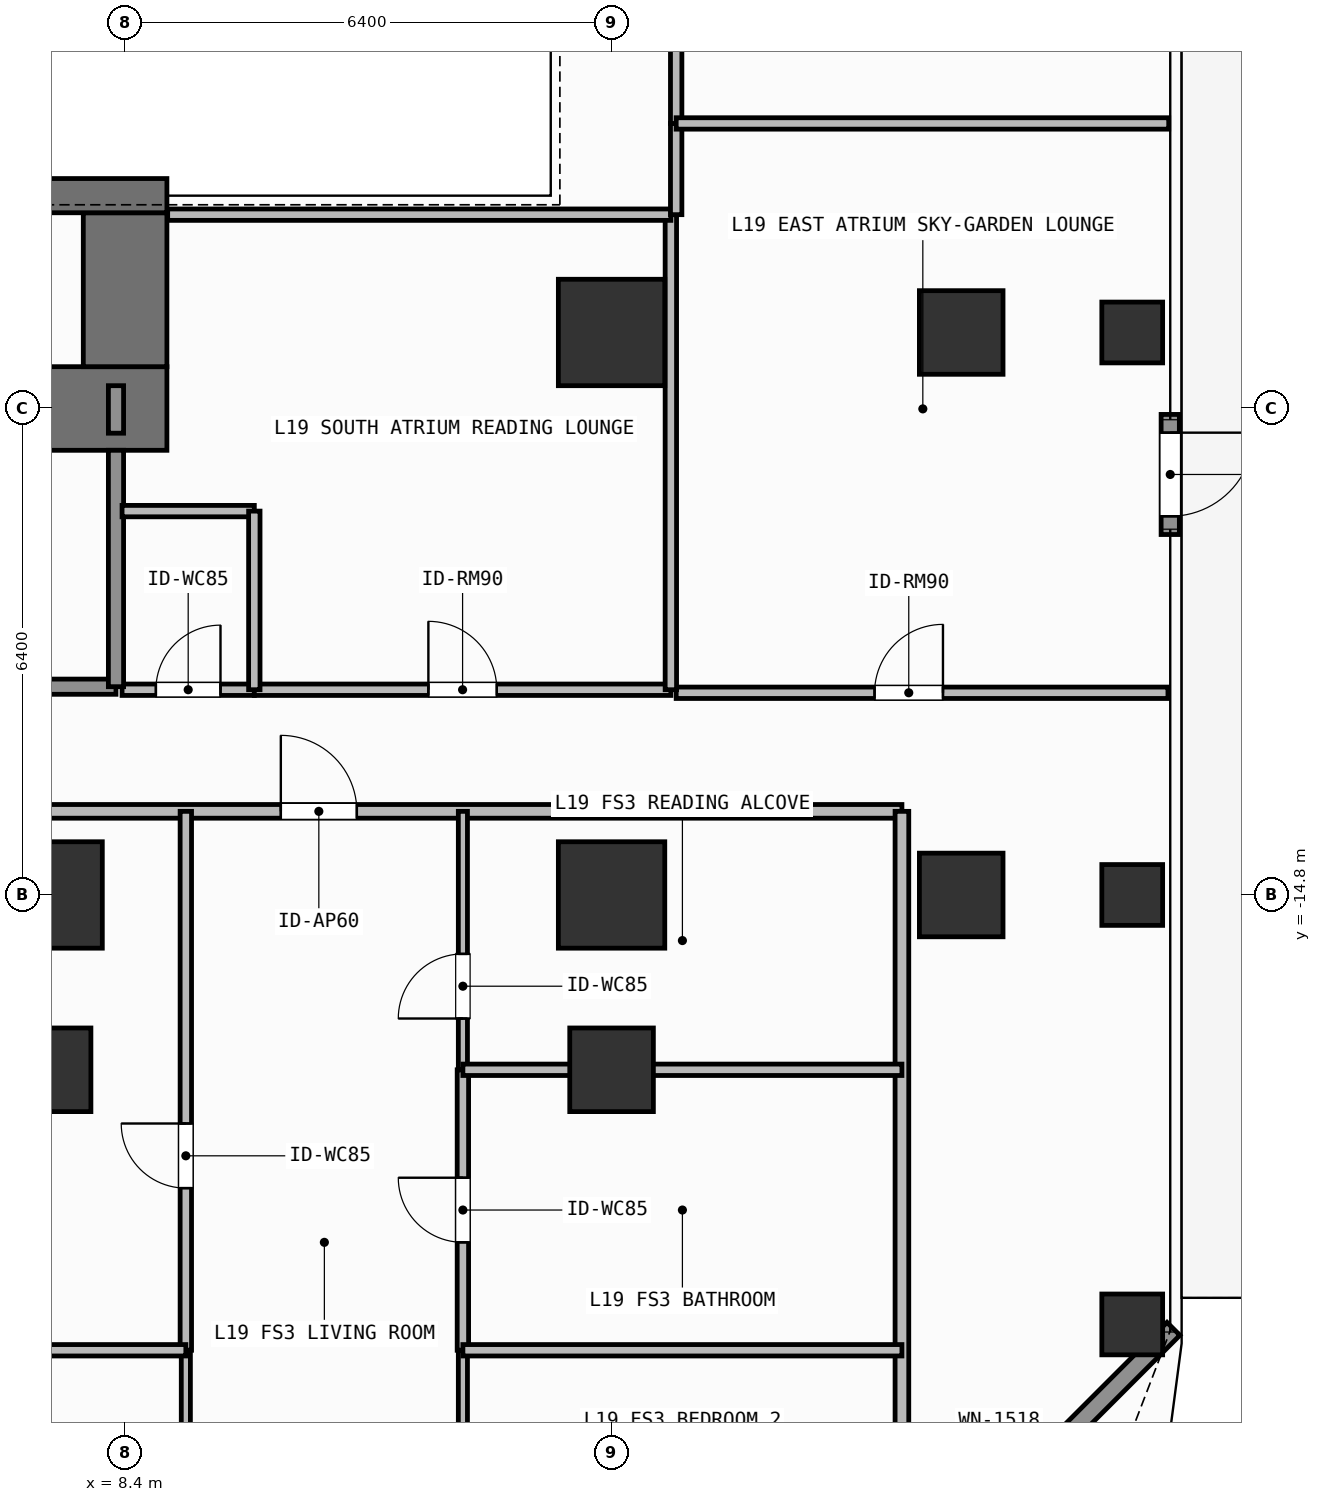
"""IFC4 building model, lengths in metres.
Left out: names, types, materials, properties, quantities, classifications, styles, units other than length and angle.
Written with IfcOpenShell. Run it as: python <this file> out.ifc"""

import sys

from ifc_helpers import new_model, si_unit, direction, frame, frame_2d, origin, origin_2d, place, context, subcontext, project, spatial, rectangle, hollow_rectangle, extrude, element, fill, save


model = new_model("IFC4")
c1 = context("Model", 3, precision=1e-05, world=origin(), true_north=direction((0.0, 1.0)))
c2 = subcontext(c1, "Body", "Model", "MODEL_VIEW")
j1 = project(units=[si_unit("LENGTHUNIT", "METRE"), si_unit("PLANEANGLEUNIT", "RADIAN")], contexts=[c1])
p1 = place(None, origin())
s1 = spatial("IfcSite", under=j1, at=p1, CompositionType="ELEMENT")
p2 = place(p1, origin())
s2 = spatial("IfcBuilding", under=s1, at=p2, CompositionType="ELEMENT")
p3 = place(p2, frame((0.0, 0.0, 73.5)))
s3 = spatial("IfcBuildingStorey", under=s2, at=p3, CompositionType="ELEMENT", Elevation=73.5)
p4 = place(p3, frame((6.12, -8.4, 0.0), z_axis=(0.0, 0.0, 1.0), x_axis=(1.0, 0.0, 0.0)))
e1 = element("IfcWall", 1, at=p4, inside=s3, PredefinedType="SHEAR", context=c2, shape_type="SweptSolid", body=[
    extrude(rectangle(XDim=2.83, YDim=1.1, at=frame_2d((1.415, 0.0))), origin(), (0.0, 0.0, 1.0), 3.9),
])
p5 = place(p3, frame((8.4, -7.85, 0.0), z_axis=(0.0, 0.0, 1.0), x_axis=(0.0, 1.0, 0.0)))
e2 = element("IfcWall", 2, at=p5, inside=s3, PredefinedType="SHEAR", context=c2, shape_type="SweptSolid", body=[
    extrude(rectangle(XDim=2.025, YDim=1.1, at=frame_2d((1.013, 0.0))), origin(), (0.0, 0.0, 1.0), 3.9),
])
p6 = place(p3, frame((3.045, -5.6, 0.0), z_axis=(0.0, 0.0, 1.0), x_axis=(1.0, 0.0, 0.0)))
e3 = element("IfcWall", 3, at=p6, inside=s3, PredefinedType="SHEAR", context=c2, shape_type="SweptSolid", body=[
    extrude(rectangle(XDim=5.905, YDim=0.45, at=frame_2d((2.953, 0.0))), origin(), (0.0, 0.0, 1.0), 3.9),
])
for number, where, z_axis, x_axis in (
    (4, (7.4, -14.8, 0.0), (0.0, 0.0, 1.0), (1.0, 0.0, 0.0)),
    (5, (14.8, -14.8, 0.0), (0.0, 0.0, 1.0), (1.0, 0.0, 0.0)),
    (6, (14.8, -7.4, 0.0), (0.0, 0.0, 1.0), (1.0, 0.0, 0.0)),
):
    element("IfcColumn", number, at=place(p3, frame(where, z_axis=z_axis, x_axis=x_axis)), inside=s3, PredefinedType="COLUMN", context=c2, shape_type="SweptSolid", body=[
        extrude(rectangle(XDim=1.4, YDim=1.4, at=origin_2d()), origin(), (0.0, 0.0, 1.0), 3.9),
    ])
for number, where, z_axis, x_axis in (
    (7, (19.4, -14.8, 0.0), (0.0, 0.0, 1.0), (1.0, 0.0, 0.0)),
    (8, (19.4, -7.4, 0.0), (0.0, 0.0, 1.0), (1.0, 0.0, 0.0)),
    (9, (7.4, -17.1, 0.0), (0.0, 0.0, 1.0), (1.0, 0.0, 0.0)),
    (10, (14.8, -17.1, 0.0), (0.0, 0.0, 1.0), (1.0, 0.0, 0.0)),
):
    element("IfcColumn", number, at=place(p3, frame(where, z_axis=z_axis, x_axis=x_axis)), inside=s3, PredefinedType="COLUMN", context=c2, shape_type="SweptSolid", body=[
        extrude(rectangle(XDim=1.1, YDim=1.1, at=origin_2d()), origin(), (0.0, 0.0, 1.0), 3.9),
    ])
for number, where, z_axis, x_axis in (
    (11, (21.65, -20.45, 0.0), (0.0, 0.0, 1.0), (1.0, 0.0, 0.0)),
    (12, (21.65, -14.8, 0.0), (0.0, 0.0, 1.0), (1.0, 0.0, 0.0)),
    (13, (21.65, -7.4, 0.0), (0.0, 0.0, 1.0), (1.0, 0.0, 0.0)),
):
    element("IfcColumn", number, at=place(p3, frame(where, z_axis=z_axis, x_axis=x_axis)), inside=s3, PredefinedType="COLUMN", context=c2, shape_type="SweptSolid", body=[
        extrude(hollow_rectangle(XDim=0.8, YDim=0.8, WallThickness=0.036, at=origin_2d()), origin(), (0.0, 0.0, 1.0), 3.9),
    ])
p7 = place(p3, frame((22.15, -8.478, 0.0), z_axis=(0.0, 0.0, 1.0), x_axis=(0.0, -1.0, 0.0)))
e14 = element("IfcWall", 14, at=p7, inside=s3, PredefinedType="SOLIDWALL", context=c2, shape_type="SweptSolid", body=[
    extrude(rectangle(XDim=1.58, YDim=0.24, at=frame_2d((0.79, 0.0))), origin(), (0.0, 0.0, 1.0), 3.6),
])
p8 = place(p7, frame((0.24, 0.0, 0.0)))
e15 = element("IfcOpeningElement", 15, at=p8, cuts=e14, PredefinedType="OPENING", context=c2, shape_type="SweptSolid", body=[
    extrude(rectangle(XDim=1.1, YDim=2.2, at=frame_2d((0.55, 1.1))), frame((0.0, 0.13, 0.0), z_axis=(0.0, -1.0, 0.0), x_axis=(1.0, 0.0, 0.0)), (0.0, 0.0, 1.0), 0.26),
])
p9 = place(p3, frame((22.192, -20.508, 0.0), z_axis=(0.0, 0.0, 1.0), x_axis=(-0.707106781187, -0.707106781187, 0.0)))
e16 = element("IfcWall", 16, at=p9, inside=s3, PredefinedType="SOLIDWALL", context=c2, shape_type="SweptSolid", body=[
    extrude(rectangle(XDim=6.484, YDim=0.24, at=frame_2d((3.242, 0.0))), origin(), (0.0, 0.0, 1.0), 3.6),
])
p10 = place(p9, frame((2.492, 0.0, 0.8)))
e17 = element("IfcOpeningElement", 17, at=p10, cuts=e16, PredefinedType="OPENING", context=c2, shape_type="SweptSolid", body=[
    extrude(rectangle(XDim=1.5, YDim=1.85, at=frame_2d((0.75, 0.925))), frame((0.0, 0.13, 0.0), z_axis=(0.0, -1.0, 0.0), x_axis=(1.0, 0.0, 0.0)), (0.0, 0.0, 1.0), 0.26),
])
p11 = place(p3, frame((4.58, -12.06, 0.0), z_axis=(0.0, 0.0, 1.0), x_axis=(1.0, 0.0, 0.0)))
e18 = element("IfcWall", 18, at=p11, inside=s3, PredefinedType="SOLIDWALL", context=c2, shape_type="SweptSolid", body=[
    extrude(rectangle(XDim=3.7, YDim=0.2, at=frame_2d((1.85, 0.0))), origin(), (0.0, 0.0, 1.0), 3.6),
])
p12 = place(p11, frame((1.212, 0.0, 0.0)))
e19 = element("IfcOpeningElement", 19, at=p12, cuts=e18, PredefinedType="OPENING", context=c2, shape_type="SweptSolid", body=[
    extrude(rectangle(XDim=1.1, YDim=2.15, at=frame_2d((0.55, 1.075))), frame((0.0, 0.11, 0.0), z_axis=(0.0, -1.0, 0.0), x_axis=(1.0, 0.0, 0.0)), (0.0, 0.0, 1.0), 0.22),
])
p13 = place(p3, frame((8.36, -12.1, 0.0), z_axis=(0.0, 0.0, 1.0), x_axis=(1.0, 0.0, 0.0)))
e20 = element("IfcWall", 20, at=p13, inside=s3, PredefinedType="PARTITIONING", context=c2, shape_type="SweptSolid", body=[
    extrude(rectangle(XDim=1.74, YDim=0.15, at=frame_2d((0.87, 0.0))), origin(), (0.0, 0.0, 1.0), 3.6),
])
p14 = place(p13, frame((0.445, 0.0, 0.0)))
e21 = element("IfcOpeningElement", 21, at=p14, cuts=e20, PredefinedType="OPENING", context=c2, shape_type="SweptSolid", body=[
    extrude(rectangle(XDim=0.85, YDim=2.1, at=frame_2d((0.425, 1.05))), frame((0.0, 0.085, 0.0), z_axis=(0.0, -1.0, 0.0), x_axis=(1.0, 0.0, 0.0)), (0.0, 0.0, 1.0), 0.17),
])
p15 = place(p3, frame((10.1, -12.1, 0.0), z_axis=(0.0, 0.0, 1.0), x_axis=(1.0, 0.0, 0.0)))
e22 = element("IfcWall", 22, at=p15, inside=s3, PredefinedType="PARTITIONING", context=c2, shape_type="SweptSolid", body=[
    extrude(rectangle(XDim=5.48, YDim=0.15, at=frame_2d((2.74, 0.0))), origin(), (0.0, 0.0, 1.0), 3.6),
])
p16 = place(p15, frame((2.29, 0.0, 0.0)))
e23 = element("IfcOpeningElement", 23, at=p16, cuts=e22, PredefinedType="OPENING", context=c2, shape_type="SweptSolid", body=[
    extrude(rectangle(XDim=0.9, YDim=2.1, at=frame_2d((0.45, 1.05))), frame((0.0, 0.085, 0.0), z_axis=(0.0, -1.0, 0.0), x_axis=(1.0, 0.0, 0.0)), (0.0, 0.0, 1.0), 0.17),
])
p17 = place(p3, frame((2.918, -13.7, 0.0), z_axis=(0.0, 0.0, 1.0), x_axis=(1.0, 0.0, 0.0)))
e24 = element("IfcWall", 24, at=p17, inside=s3, PredefinedType="PARTITIONING", context=c2, shape_type="SweptSolid", body=[
    extrude(rectangle(XDim=15.702, YDim=0.18, at=frame_2d((7.851, 0.0))), origin(), (0.0, 0.0, 1.0), 3.6),
])
p18 = place(p17, frame((7.531, 0.0, 0.0)))
e25 = element("IfcOpeningElement", 25, at=p18, cuts=e24, PredefinedType="OPENING", context=c2, shape_type="SweptSolid", body=[
    extrude(rectangle(XDim=1.0, YDim=2.2, at=frame_2d((0.5, 1.1))), frame((0.0, 0.1, 0.0), z_axis=(0.0, -1.0, 0.0), x_axis=(1.0, 0.0, 0.0)), (0.0, 0.0, 1.0), 0.2),
])
p19 = place(p3, frame((9.199, -20.79, 0.0), z_axis=(0.0, 0.0, 1.0), x_axis=(0.0, 1.0, 0.0)))
e26 = element("IfcWall", 26, at=p19, inside=s3, PredefinedType="PARTITIONING", context=c2, shape_type="SweptSolid", body=[
    extrude(rectangle(XDim=7.09, YDim=0.15, at=frame_2d((3.545, 0.0))), origin(), (0.0, 0.0, 1.0), 3.6),
])
p20 = place(p19, frame((2.133, 0.0, 0.0)))
e27 = element("IfcOpeningElement", 27, at=p20, cuts=e26, PredefinedType="OPENING", context=c2, shape_type="SweptSolid", body=[
    extrude(rectangle(XDim=0.85, YDim=2.1, at=frame_2d((0.425, 1.05))), frame((0.0, 0.085, 0.0), z_axis=(0.0, -1.0, 0.0), x_axis=(1.0, 0.0, 0.0)), (0.0, 0.0, 1.0), 0.17),
])
p21 = place(p3, frame((9.199, -25.03, 0.0), z_axis=(0.0, 0.0, 1.0), x_axis=(0.0, 1.0, 0.0)))
e28 = element("IfcWall", 28, at=p21, inside=s3, PredefinedType="PARTITIONING", context=c2, shape_type="SweptSolid", body=[
    extrude(rectangle(XDim=4.24, YDim=0.12, at=frame_2d((2.12, 0.0))), origin(), (0.0, 0.0, 1.0), 3.6),
])
p22 = place(p21, frame((1.581, 0.0, 0.0)))
e29 = element("IfcOpeningElement", 29, at=p22, cuts=e28, PredefinedType="OPENING", context=c2, shape_type="SweptSolid", body=[
    extrude(rectangle(XDim=0.9, YDim=2.1, at=frame_2d((0.45, 1.05))), frame((0.0, 0.07, 0.0), z_axis=(0.0, -1.0, 0.0), x_axis=(1.0, 0.0, 0.0)), (0.0, 0.0, 1.0), 0.14),
])
p23 = place(p3, frame((12.844, -20.79, 0.0), z_axis=(0.0, 0.0, 1.0), x_axis=(0.0, 1.0, 0.0)))
e30 = element("IfcWall", 30, at=p23, inside=s3, PredefinedType="PARTITIONING", context=c2, shape_type="SweptSolid", body=[
    extrude(rectangle(XDim=3.69, YDim=0.15, at=frame_2d((1.845, 0.0))), origin(), (0.0, 0.0, 1.0), 3.6),
])
p24 = place(p23, frame((1.42, 0.0, 0.0)))
e31 = element("IfcOpeningElement", 31, at=p24, cuts=e30, PredefinedType="OPENING", context=c2, shape_type="SweptSolid", body=[
    extrude(rectangle(XDim=0.85, YDim=2.1, at=frame_2d((0.425, 1.05))), frame((0.0, 0.085, 0.0), z_axis=(0.0, -1.0, 0.0), x_axis=(1.0, 0.0, 0.0)), (0.0, 0.0, 1.0), 0.17),
])
p25 = place(p3, frame((12.844, -17.1, 0.0), z_axis=(0.0, 0.0, 1.0), x_axis=(0.0, 1.0, 0.0)))
e32 = element("IfcWall", 32, at=p25, inside=s3, PredefinedType="PARTITIONING", context=c2, shape_type="SweptSolid", body=[
    extrude(rectangle(XDim=3.4, YDim=0.12, at=frame_2d((1.7, 0.0))), origin(), (0.0, 0.0, 1.0), 3.6),
])
p26 = place(p25, frame((0.675, 0.0, 0.0)))
e33 = element("IfcOpeningElement", 33, at=p26, cuts=e32, PredefinedType="OPENING", context=c2, shape_type="SweptSolid", body=[
    extrude(rectangle(XDim=0.85, YDim=2.1, at=frame_2d((0.425, 1.05))), frame((0.0, 0.07, 0.0), z_axis=(0.0, -1.0, 0.0), x_axis=(1.0, 0.0, 0.0)), (0.0, 0.0, 1.0), 0.14),
])
p27 = place(p3, frame((12.844, -25.03, 0.0), z_axis=(0.0, 0.0, 1.0), x_axis=(0.0, 1.0, 0.0)))
e34 = element("IfcWall", 34, at=p27, inside=s3, PredefinedType="PARTITIONING", context=c2, shape_type="SweptSolid", body=[
    extrude(rectangle(XDim=4.24, YDim=0.12, at=frame_2d((2.12, 0.0))), origin(), (0.0, 0.0, 1.0), 3.6),
])
p28 = place(p27, frame((1.581, 0.0, 0.0)))
e35 = element("IfcOpeningElement", 35, at=p28, cuts=e34, PredefinedType="OPENING", context=c2, shape_type="SweptSolid", body=[
    extrude(rectangle(XDim=0.9, YDim=2.1, at=frame_2d((0.45, 1.05))), frame((0.0, 0.07, 0.0), z_axis=(0.0, -1.0, 0.0), x_axis=(1.0, 0.0, 0.0)), (0.0, 0.0, 1.0), 0.14),
])
p29 = place(p3, frame((15.65, -12.14, 0.0), z_axis=(0.0, 0.0, 1.0), x_axis=(1.0, 0.0, 0.0)))
e36 = element("IfcWall", 36, at=p29, inside=s3, PredefinedType="PARTITIONING", context=c2, shape_type="SweptSolid", body=[
    extrude(rectangle(XDim=6.47, YDim=0.15, at=frame_2d((3.235, 0.0))), origin(), (0.0, 0.0, 1.0), 3.6),
])
p30 = place(p29, frame((2.61, 0.0, 0.0)))
e37 = element("IfcOpeningElement", 37, at=p30, cuts=e36, PredefinedType="OPENING", context=c2, shape_type="SweptSolid", body=[
    extrude(rectangle(XDim=0.9, YDim=2.1, at=frame_2d((0.45, 1.05))), frame((0.0, 0.085, 0.0), z_axis=(0.0, -1.0, 0.0), x_axis=(1.0, 0.0, 0.0)), (0.0, 0.0, 1.0), 0.17),
])
p31 = place(p3, frame((8.28, -12.06, 0.0), z_axis=(0.0, 0.0, 1.0), x_axis=(0.0, 1.0, 0.0)))
e38 = element("IfcWall", 38, at=p31, inside=s3, PredefinedType="SOLIDWALL", context=c2, shape_type="SweptSolid", body=[
    extrude(rectangle(XDim=3.11, YDim=0.2, at=frame_2d((1.555, 0.0))), origin(), (0.0, 0.0, 1.0), 3.6),
])
p32 = place(p3, frame((8.28, -8.725, 0.0), z_axis=(0.0, 0.0, 1.0), x_axis=(0.0, 1.0, 0.0)))
e39 = element("IfcWall", 39, at=p32, inside=s3, PredefinedType="SOLIDWALL", context=c2, shape_type="SweptSolid", body=[
    extrude(rectangle(XDim=0.625, YDim=0.2, at=frame_2d((0.312, 0.0))), origin(), (0.0, 0.0, 1.0), 3.6),
])
p33 = place(p3, frame((8.36, -9.75, 0.0), z_axis=(0.0, 0.0, 1.0), x_axis=(1.0, 0.0, 0.0)))
e40 = element("IfcWall", 40, at=p33, inside=s3, PredefinedType="PARTITIONING", context=c2, shape_type="SweptSolid", body=[
    extrude(rectangle(XDim=1.74, YDim=0.15, at=frame_2d((0.87, 0.0))), origin(), (0.0, 0.0, 1.0), 3.6),
])
p34 = place(p3, frame((10.1, -12.1, 0.0), z_axis=(0.0, 0.0, 1.0), x_axis=(0.0, 1.0, 0.0)))
e41 = element("IfcWall", 41, at=p34, inside=s3, PredefinedType="PARTITIONING", context=c2, shape_type="SweptSolid", body=[
    extrude(rectangle(XDim=2.35, YDim=0.15, at=frame_2d((1.175, 0.0))), origin(), (0.0, 0.0, 1.0), 3.6),
])
p35 = place(p3, frame((15.58, -12.1, 0.0), z_axis=(0.0, 0.0, 1.0), x_axis=(0.0, 1.0, 0.0)))
e42 = element("IfcWall", 42, at=p35, inside=s3, PredefinedType="PARTITIONING", context=c2, shape_type="SweptSolid", body=[
    extrude(rectangle(XDim=6.25, YDim=0.15, at=frame_2d((3.125, 0.0))), origin(), (0.0, 0.0, 1.0), 3.6),
])
p36 = place(p3, frame((8.96, -5.85, 0.0), z_axis=(0.0, 0.0, 1.0), x_axis=(1.0, 0.0, 0.0)))
e43 = element("IfcWall", 43, at=p36, inside=s3, PredefinedType="PARTITIONING", context=c2, shape_type="SweptSolid", body=[
    extrude(rectangle(XDim=6.62, YDim=0.15, at=frame_2d((3.31, 0.0))), origin(), (0.0, 0.0, 1.0), 3.6),
])
p37 = place(p3, frame((18.62, -23.91, 0.0), z_axis=(0.0, 0.0, 1.0), x_axis=(0.0, 1.0, 0.0)))
e44 = element("IfcWall", 44, at=p37, inside=s3, PredefinedType="PARTITIONING", context=c2, shape_type="SweptSolid", body=[
    extrude(rectangle(XDim=10.21, YDim=0.18, at=frame_2d((5.105, 0.0))), origin(), (0.0, 0.0, 1.0), 3.6),
])
p38 = place(p3, frame((2.918, -20.79, 0.0), z_axis=(0.0, 0.0, 1.0), x_axis=(1.0, 0.0, 0.0)))
e45 = element("IfcWall", 45, at=p38, inside=s3, PredefinedType="PARTITIONING", context=c2, shape_type="SweptSolid", body=[
    extrude(rectangle(XDim=6.281, YDim=0.15, at=frame_2d((3.141, 0.0))), origin(), (0.0, 0.0, 1.0), 3.6),
])
p39 = place(p3, frame((12.844, -17.1, 0.0), z_axis=(0.0, 0.0, 1.0), x_axis=(1.0, 0.0, 0.0)))
e46 = element("IfcWall", 46, at=p39, inside=s3, PredefinedType="PARTITIONING", context=c2, shape_type="SweptSolid", body=[
    extrude(rectangle(XDim=5.776, YDim=0.15, at=frame_2d((2.888, 0.0))), origin(), (0.0, 0.0, 1.0), 3.002),
])
p40 = place(p3, frame((12.844, -20.79, 0.0), z_axis=(0.0, 0.0, 1.0), x_axis=(1.0, 0.0, 0.0)))
e47 = element("IfcWall", 47, at=p40, inside=s3, PredefinedType="PARTITIONING", context=c2, shape_type="SweptSolid", body=[
    extrude(rectangle(XDim=5.776, YDim=0.15, at=frame_2d((2.888, 0.0))), origin(), (0.0, 0.0, 1.0), 3.6),
])
p41 = place(p3, frame((15.65, -5.85, 0.0), z_axis=(0.0, 0.0, 1.0), x_axis=(0.0, 1.0, 0.0)))
e48 = element("IfcWall", 48, at=p41, inside=s3, PredefinedType="PARTITIONING", context=c2, shape_type="SweptSolid", body=[
    extrude(rectangle(XDim=1.2, YDim=0.15, at=frame_2d((0.6, 0.0))), origin(), (0.0, 0.0, 1.0), 3.6),
])
p42 = place(p3, frame((15.65, -4.65, 0.0), z_axis=(0.0, 0.0, 1.0), x_axis=(0.0, 1.0, 0.0)))
e49 = element("IfcWall", 49, at=p42, inside=s3, PredefinedType="PARTITIONING", context=c2, shape_type="SweptSolid", body=[
    extrude(rectangle(XDim=10.5, YDim=0.15, at=frame_2d((5.25, 0.0))), origin(), (0.0, 0.0, 1.0), 3.6),
])
p43 = place(p3, frame((15.65, -4.65, 0.0), z_axis=(0.0, 0.0, 1.0), x_axis=(1.0, 0.0, 0.0)))
e50 = element("IfcWall", 50, at=p43, inside=s3, PredefinedType="PARTITIONING", context=c2, shape_type="SweptSolid", body=[
    extrude(rectangle(XDim=6.48, YDim=0.15, at=frame_2d((3.24, 0.0))), origin(), (0.0, 0.0, 1.0), 3.6),
])
p44 = place(p8, origin())
e51 = element("IfcDoor", 51, at=p44, inside=s3, OperationType="SINGLE_SWING_LEFT", PredefinedType="DOOR", context=c2, shape_type="SweptSolid", body=[
    extrude(rectangle(XDim=1.1, YDim=2.2, at=frame_2d((0.55, 1.1))), frame((0.0, 0.025, 0.0), z_axis=(0.0, -1.0, 0.0), x_axis=(1.0, 0.0, 0.0)), (0.0, 0.0, 1.0), 0.05),
])
fill(e15, e51)
p45 = place(p14, origin())
e52 = element("IfcDoor", 52, at=p45, inside=s3, OperationType="SINGLE_SWING_RIGHT", PredefinedType="DOOR", context=c2, shape_type="SweptSolid", body=[
    extrude(rectangle(XDim=0.85, YDim=2.1, at=frame_2d((0.425, 1.05))), frame((0.0, 0.025, 0.0), z_axis=(0.0, -1.0, 0.0), x_axis=(1.0, 0.0, 0.0)), (0.0, 0.0, 1.0), 0.05),
])
fill(e21, e52)
p46 = place(p16, origin())
e53 = element("IfcDoor", 53, at=p46, inside=s3, OperationType="SINGLE_SWING_LEFT", PredefinedType="DOOR", context=c2, shape_type="SweptSolid", body=[
    extrude(rectangle(XDim=0.9, YDim=2.1, at=frame_2d((0.45, 1.05))), frame((0.0, 0.025, 0.0), z_axis=(0.0, -1.0, 0.0), x_axis=(1.0, 0.0, 0.0)), (0.0, 0.0, 1.0), 0.05),
])
fill(e23, e53)
p47 = place(p18, origin())
e54 = element("IfcDoor", 54, at=p47, inside=s3, OperationType="SINGLE_SWING_LEFT", PredefinedType="DOOR", context=c2, shape_type="SweptSolid", body=[
    extrude(rectangle(XDim=1.0, YDim=2.2, at=frame_2d((0.5, 1.1))), frame((0.0, 0.025, 0.0), z_axis=(0.0, -1.0, 0.0), x_axis=(1.0, 0.0, 0.0)), (0.0, 0.0, 1.0), 0.05),
])
fill(e25, e54)
p48 = place(p20, origin())
e55 = element("IfcDoor", 55, at=p48, inside=s3, OperationType="SINGLE_SWING_RIGHT", PredefinedType="DOOR", context=c2, shape_type="SweptSolid", body=[
    extrude(rectangle(XDim=0.85, YDim=2.1, at=frame_2d((0.425, 1.05))), frame((0.0, 0.025, 0.0), z_axis=(0.0, -1.0, 0.0), x_axis=(1.0, 0.0, 0.0)), (0.0, 0.0, 1.0), 0.05),
])
fill(e27, e55)
p49 = place(p24, origin())
e56 = element("IfcDoor", 56, at=p49, inside=s3, OperationType="SINGLE_SWING_RIGHT", PredefinedType="DOOR", context=c2, shape_type="SweptSolid", body=[
    extrude(rectangle(XDim=0.85, YDim=2.1, at=frame_2d((0.425, 1.05))), frame((0.0, 0.025, 0.0), z_axis=(0.0, -1.0, 0.0), x_axis=(1.0, 0.0, 0.0)), (0.0, 0.0, 1.0), 0.05),
])
fill(e31, e56)
p50 = place(p26, origin())
e57 = element("IfcDoor", 57, at=p50, inside=s3, OperationType="SINGLE_SWING_LEFT", PredefinedType="DOOR", context=c2, shape_type="SweptSolid", body=[
    extrude(rectangle(XDim=0.85, YDim=2.1, at=frame_2d((0.425, 1.05))), frame((0.0, 0.025, 0.0), z_axis=(0.0, -1.0, 0.0), x_axis=(1.0, 0.0, 0.0)), (0.0, 0.0, 1.0), 0.05),
])
fill(e33, e57)
p51 = place(p30, origin())
e58 = element("IfcDoor", 58, at=p51, inside=s3, OperationType="SINGLE_SWING_RIGHT", PredefinedType="DOOR", context=c2, shape_type="SweptSolid", body=[
    extrude(rectangle(XDim=0.9, YDim=2.1, at=frame_2d((0.45, 1.05))), frame((0.0, 0.025, 0.0), z_axis=(0.0, -1.0, 0.0), x_axis=(1.0, 0.0, 0.0)), (0.0, 0.0, 1.0), 0.05),
])
fill(e37, e58)
save(model, sys.argv[1])
